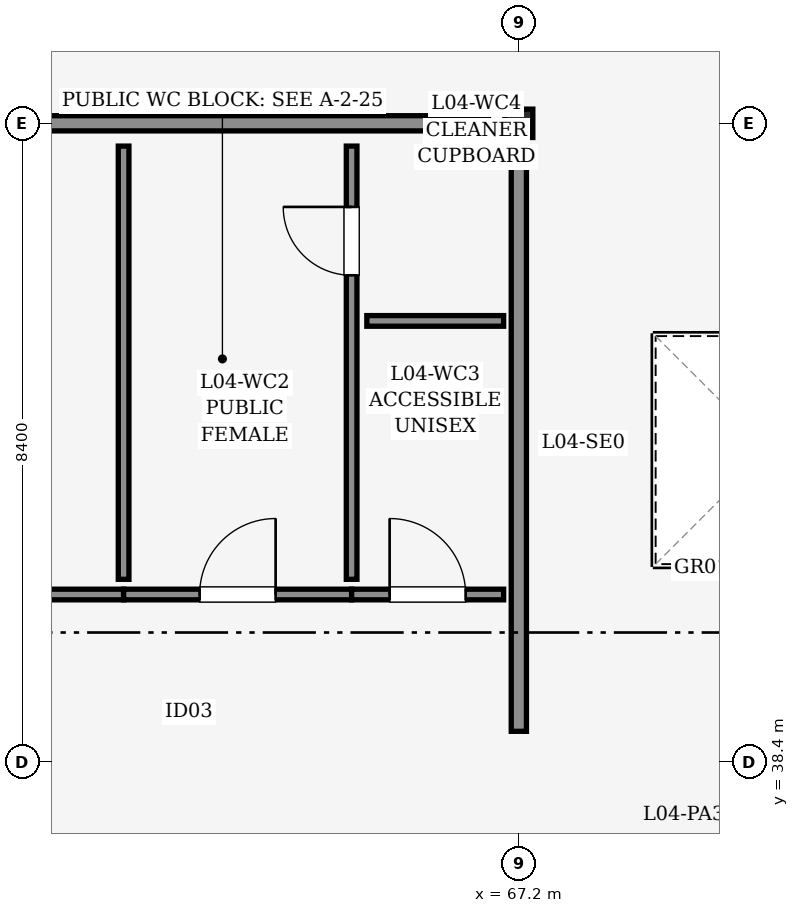
"""IFC4 building model, lengths in metres.
Left out: names, types, materials, properties, quantities, classifications, styles, units other than length and angle.
Written with IfcOpenShell. Run it as: python <this file> out.ifc"""

import sys

from ifc_helpers import new_model, si_unit, direction, frame, frame_2d, origin, origin_2d, place, context, subcontext, project, spatial, rectangle, i_section, extrude, element, fill, save


model = new_model("IFC4")
c1 = context("Model", 3, precision=1e-05, world=origin(), true_north=direction((0.0, 1.0)))
c2 = subcontext(c1, "Body", "Model", "MODEL_VIEW")
j1 = project(units=[si_unit("LENGTHUNIT", "METRE"), si_unit("PLANEANGLEUNIT", "RADIAN")], contexts=[c1])
p1 = place(None, origin())
s1 = spatial("IfcSite", under=j1, at=p1, CompositionType="ELEMENT")
p2 = place(p1, origin())
s2 = spatial("IfcBuilding", under=s1, at=p2, CompositionType="ELEMENT")
p3 = place(p2, frame((0.0, 0.0, 16.2)))
s3 = spatial("IfcBuildingStorey", under=s2, at=p3, CompositionType="ELEMENT", Elevation=16.2)
for number, where, z_axis, x_axis in (
    (1, (67.2, 38.4, 0.0), (0.0, 0.0, 1.0), (1.0, 0.0, 0.0)),
    (2, (67.2, 46.8, 0.0), (0.0, 0.0, 1.0), (1.0, 0.0, 0.0)),
):
    element("IfcColumn", number, at=place(p3, frame(where, z_axis=z_axis, x_axis=x_axis)), inside=s3, PredefinedType="COLUMN", context=c2, shape_type="SweptSolid", body=[
        extrude(i_section(OverallWidth=0.373, OverallDepth=0.368, WebThickness=0.014, FlangeThickness=0.024, FilletRadius=0.015, at=origin_2d()), origin(), (0.0, 0.0, 1.0), 3.6),
    ])
p4 = place(p3, frame((59.2, 38.4, 0.0), z_axis=(0.0, 0.0, 1.0), x_axis=(1.0, 0.0, 0.0)))
e3 = element("IfcWall", 3, at=p4, inside=s3, PredefinedType="PARTITIONING", context=c2, shape_type="SweptSolid", body=[
    extrude(rectangle(XDim=7.6, YDim=0.2, at=frame_2d((3.8, 0.0))), origin(), (0.0, 0.0, 1.0), 2.525),
])
p5 = place(p4, frame((3.2, 0.0, 0.0)))
e4 = element("IfcOpeningElement", 4, at=p5, cuts=e3, PredefinedType="OPENING", context=c2, shape_type="SweptSolid", body=[
    extrude(rectangle(XDim=0.92, YDim=2.1, at=frame_2d((0.46, 1.05))), frame((0.0, 0.11, 0.0), z_axis=(0.0, -1.0, 0.0), x_axis=(1.0, 0.0, 0.0)), (0.0, 0.0, 1.0), 0.22),
])
p6 = place(p3, frame((59.2, 46.8, 0.0), z_axis=(0.0, 0.0, 1.0), x_axis=(1.0, 0.0, 0.0)))
e5 = element("IfcWall", 5, at=p6, inside=s3, PredefinedType="PARTITIONING", context=c2, shape_type="SweptSolid", body=[
    extrude(rectangle(XDim=7.6, YDim=0.2, at=frame_2d((3.8, 0.0))), origin(), (0.0, 0.0, 1.0), 2.525),
])
p7 = place(p3, frame((67.2, 38.8, 0.0), z_axis=(0.0, 0.0, 1.0), x_axis=(0.0, 1.0, 0.0)))
e6 = element("IfcWall", 6, at=p7, inside=s3, PredefinedType="PARTITIONING", context=c2, shape_type="SweptSolid", body=[
    extrude(rectangle(XDim=7.6, YDim=0.2, at=frame_2d((3.8, 0.0))), origin(), (0.0, 0.0, 1.0), 2.525),
])
p8 = place(p3, frame((59.0, 40.6, 0.0), z_axis=(0.0, 0.0, 1.0), x_axis=(1.0, 0.0, 0.0)))
e7 = element("IfcWall", 7, at=p8, inside=s3, PredefinedType="PARTITIONING", context=c2, shape_type="SweptSolid", body=[
    extrude(rectangle(XDim=3.0, YDim=0.14, at=frame_2d((1.5, 0.0))), origin(), (0.0, 0.0, 1.0), 2.525),
])
p9 = place(p8, frame((1.0, 0.0, 0.0)))
e8 = element("IfcOpeningElement", 8, at=p9, cuts=e7, PredefinedType="OPENING", context=c2, shape_type="SweptSolid", body=[
    extrude(rectangle(XDim=1.0, YDim=2.1, at=frame_2d((0.5, 1.05))), frame((0.0, 0.08, 0.0), z_axis=(0.0, -1.0, 0.0), x_axis=(1.0, 0.0, 0.0)), (0.0, 0.0, 1.0), 0.16),
])
p10 = place(p3, frame((62.0, 40.6, 0.0), z_axis=(0.0, 0.0, 1.0), x_axis=(1.0, 0.0, 0.0)))
e9 = element("IfcWall", 9, at=p10, inside=s3, PredefinedType="PARTITIONING", context=c2, shape_type="SweptSolid", body=[
    extrude(rectangle(XDim=3.0, YDim=0.14, at=frame_2d((1.5, 0.0))), origin(), (0.0, 0.0, 1.0), 2.525),
])
p11 = place(p10, frame((1.0, 0.0, 0.0)))
e10 = element("IfcOpeningElement", 10, at=p11, cuts=e9, PredefinedType="OPENING", context=c2, shape_type="SweptSolid", body=[
    extrude(rectangle(XDim=1.0, YDim=2.1, at=frame_2d((0.5, 1.05))), frame((0.0, 0.08, 0.0), z_axis=(0.0, -1.0, 0.0), x_axis=(1.0, 0.0, 0.0)), (0.0, 0.0, 1.0), 0.16),
])
p12 = place(p3, frame((65.0, 40.6, 0.0), z_axis=(0.0, 0.0, 1.0), x_axis=(1.0, 0.0, 0.0)))
e11 = element("IfcWall", 11, at=p12, inside=s3, PredefinedType="PARTITIONING", context=c2, shape_type="SweptSolid", body=[
    extrude(rectangle(XDim=2.0, YDim=0.14, at=frame_2d((1.0, 0.0))), origin(), (0.0, 0.0, 1.0), 2.525),
])
p13 = place(p12, frame((0.5, 0.0, 0.0)))
e12 = element("IfcOpeningElement", 12, at=p13, cuts=e11, PredefinedType="OPENING", context=c2, shape_type="SweptSolid", body=[
    extrude(rectangle(XDim=1.0, YDim=2.1, at=frame_2d((0.5, 1.05))), frame((0.0, 0.08, 0.0), z_axis=(0.0, -1.0, 0.0), x_axis=(1.0, 0.0, 0.0)), (0.0, 0.0, 1.0), 0.16),
])
p14 = place(p3, frame((62.0, 40.8, 0.0), z_axis=(0.0, 0.0, 1.0), x_axis=(0.0, 1.0, 0.0)))
e13 = element("IfcWall", 13, at=p14, inside=s3, PredefinedType="PARTITIONING", context=c2, shape_type="SweptSolid", body=[
    extrude(rectangle(XDim=5.7, YDim=0.14, at=frame_2d((2.85, 0.0))), origin(), (0.0, 0.0, 1.0), 2.525),
])
p15 = place(p3, frame((65.0, 40.8, 0.0), z_axis=(0.0, 0.0, 1.0), x_axis=(0.0, 1.0, 0.0)))
e14 = element("IfcWall", 14, at=p15, inside=s3, PredefinedType="PARTITIONING", context=c2, shape_type="SweptSolid", body=[
    extrude(rectangle(XDim=5.7, YDim=0.14, at=frame_2d((2.85, 0.0))), origin(), (0.0, 0.0, 1.0), 2.525),
])
p16 = place(p15, frame((4.0, 0.0, 0.0)))
e15 = element("IfcOpeningElement", 15, at=p16, cuts=e14, PredefinedType="OPENING", context=c2, shape_type="SweptSolid", body=[
    extrude(rectangle(XDim=0.9, YDim=2.05, at=frame_2d((0.45, 1.025))), frame((0.0, 0.08, 0.0), z_axis=(0.0, -1.0, 0.0), x_axis=(1.0, 0.0, 0.0)), (0.0, 0.0, 1.0), 0.16),
])
p17 = place(p3, frame((65.2, 44.2, 0.0), z_axis=(0.0, 0.0, 1.0), x_axis=(1.0, 0.0, 0.0)))
e16 = element("IfcWall", 16, at=p17, inside=s3, PredefinedType="PARTITIONING", context=c2, shape_type="SweptSolid", body=[
    extrude(rectangle(XDim=1.8, YDim=0.14, at=frame_2d((0.9, 0.0))), origin(), (0.0, 0.0, 1.0), 2.525),
])
p18 = place(p5, origin())
e17 = element("IfcDoor", 17, at=p18, inside=s3, OperationType="SINGLE_SWING_RIGHT", PredefinedType="DOOR", context=c2, shape_type="SweptSolid", body=[
    extrude(rectangle(XDim=0.92, YDim=2.1, at=frame_2d((0.46, 1.05))), frame((0.0, 0.025, 0.0), z_axis=(0.0, -1.0, 0.0), x_axis=(1.0, 0.0, 0.0)), (0.0, 0.0, 1.0), 0.05),
])
fill(e4, e17)
p19 = place(p11, origin())
e18 = element("IfcDoor", 18, at=p19, inside=s3, OperationType="SINGLE_SWING_RIGHT", PredefinedType="DOOR", context=c2, shape_type="SweptSolid", body=[
    extrude(rectangle(XDim=1.0, YDim=2.1, at=frame_2d((0.5, 1.05))), frame((0.0, 0.025, 0.0), z_axis=(0.0, -1.0, 0.0), x_axis=(1.0, 0.0, 0.0)), (0.0, 0.0, 1.0), 0.05),
])
fill(e10, e18)
p20 = place(p13, origin())
e19 = element("IfcDoor", 19, at=p20, inside=s3, OperationType="SINGLE_SWING_LEFT", PredefinedType="DOOR", context=c2, shape_type="SweptSolid", body=[
    extrude(rectangle(XDim=1.0, YDim=2.1, at=frame_2d((0.5, 1.05))), frame((0.0, 0.025, 0.0), z_axis=(0.0, -1.0, 0.0), x_axis=(1.0, 0.0, 0.0)), (0.0, 0.0, 1.0), 0.05),
])
fill(e12, e19)
p21 = place(p16, origin())
e20 = element("IfcDoor", 20, at=p21, inside=s3, OperationType="SINGLE_SWING_RIGHT", PredefinedType="DOOR", context=c2, shape_type="SweptSolid", body=[
    extrude(rectangle(XDim=0.9, YDim=2.05, at=frame_2d((0.45, 1.025))), frame((0.0, 0.025, 0.0), z_axis=(0.0, -1.0, 0.0), x_axis=(1.0, 0.0, 0.0)), (0.0, 0.0, 1.0), 0.05),
])
fill(e15, e20)
save(model, sys.argv[1])
